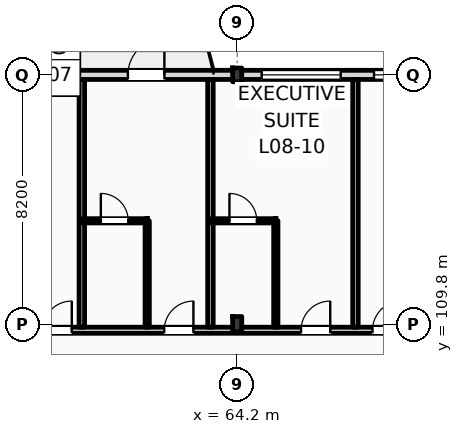
"""IFC4 building model, lengths in metres.
Left out: names, types, materials, properties, quantities, classifications, styles, units other than length and angle.
Written with IfcOpenShell. Run it as: python <this file> out.ifc"""

import sys

from ifc_helpers import new_model, si_unit, direction, frame, frame_2d, origin, origin_2d, place, context, subcontext, project, spatial, rectangle, i_section, extrude, element, fill, save


model = new_model("IFC4")
c1 = context("Model", 3, precision=1e-05, world=origin(), true_north=direction((0.0, 1.0)))
c2 = subcontext(c1, "Body", "Model", "MODEL_VIEW")
j1 = project(units=[si_unit("LENGTHUNIT", "METRE"), si_unit("PLANEANGLEUNIT", "RADIAN")], contexts=[c1])
p1 = place(None, origin())
s1 = spatial("IfcSite", under=j1, at=p1, CompositionType="ELEMENT")
p2 = place(p1, origin())
s2 = spatial("IfcBuilding", under=s1, at=p2, CompositionType="ELEMENT")
p3 = place(p2, frame((0.0, 0.0, 35.4)))
s3 = spatial("IfcBuildingStorey", under=s2, at=p3, CompositionType="ELEMENT", Elevation=35.4)
p4 = place(p3, frame((64.2, 109.8, 0.0), z_axis=(0.0, 0.0, 1.0), x_axis=(1.0, 0.0, 0.0)))
e1 = element("IfcColumn", 1, at=p4, inside=s3, PredefinedType="COLUMN", context=c2, shape_type="SweptSolid", body=[
    extrude(i_section(OverallWidth=0.3, OverallDepth=0.5, WebThickness=0.014, FlangeThickness=0.028, FilletRadius=0.027, at=origin_2d()), origin(), (0.0, 0.0, 1.0), 3.6),
])
p5 = place(p3, frame((64.2, 118.0, 0.0), z_axis=(0.0, 0.0, 1.0), x_axis=(1.0, 0.0, 0.0)))
e2 = element("IfcColumn", 2, at=p5, inside=s3, PredefinedType="COLUMN", context=c2, shape_type="SweptSolid", body=[
    extrude(i_section(OverallWidth=0.3, OverallDepth=0.45, WebThickness=0.014, FlangeThickness=0.026, FilletRadius=0.027, at=origin_2d()), origin(), (0.0, 0.0, 1.0), 3.6),
])
p6 = place(p3, frame((22.5, 118.0, 0.0), z_axis=(0.0, 0.0, 1.0), x_axis=(1.0, 0.0, 0.0)))
e3 = element("IfcWall", 3, at=p6, inside=s3, PredefinedType="STANDARD", context=c2, shape_type="SweptSolid", body=[
    extrude(rectangle(XDim=72.9, YDim=0.3, at=frame_2d((36.45, 0.0))), origin(), (0.0, 0.0, 1.0), 2.92),
])
p7 = place(p6, frame((0.91, 0.0, 0.9)))
e4 = element("IfcOpeningElement", 4, at=p7, cuts=e3, PredefinedType="OPENING", context=c2, shape_type="SweptSolid", body=[
    extrude(rectangle(XDim=0.9, YDim=1.84, at=frame_2d((0.45, 0.92))), frame((0.0, 0.16, 0.0), z_axis=(0.0, -1.0, 0.0), x_axis=(1.0, 0.0, 0.0)), (0.0, 0.0, 1.0), 0.32),
])
p8 = place(p6, frame((6.665, 0.0, 0.0)))
e5 = element("IfcOpeningElement", 5, at=p8, cuts=e3, PredefinedType="OPENING", context=c2, shape_type="SweptSolid", body=[
    extrude(rectangle(XDim=1.2, YDim=2.25, at=frame_2d((0.6, 1.125))), frame((0.0, 0.16, 0.0), z_axis=(0.0, -1.0, 0.0), x_axis=(1.0, 0.0, 0.0)), (0.0, 0.0, 1.0), 0.32),
])
p9 = place(p6, frame((11.355, 0.0, 0.9)))
e6 = element("IfcOpeningElement", 6, at=p9, cuts=e3, PredefinedType="OPENING", context=c2, shape_type="SweptSolid", body=[
    extrude(rectangle(XDim=1.1, YDim=1.5, at=frame_2d((0.55, 0.75))), frame((0.0, 0.16, 0.0), z_axis=(0.0, -1.0, 0.0), x_axis=(1.0, 0.0, 0.0)), (0.0, 0.0, 1.0), 0.32),
])
p10 = place(p6, frame((15.58, 0.0, 0.9)))
e7 = element("IfcOpeningElement", 7, at=p10, cuts=e3, PredefinedType="OPENING", context=c2, shape_type="SweptSolid", body=[
    extrude(rectangle(XDim=1.25, YDim=1.6, at=frame_2d((0.625, 0.8))), frame((0.0, 0.16, 0.0), z_axis=(0.0, -1.0, 0.0), x_axis=(1.0, 0.0, 0.0)), (0.0, 0.0, 1.0), 0.32),
])
p11 = place(p6, frame((21.08, 0.0, 0.0)))
e8 = element("IfcOpeningElement", 8, at=p11, cuts=e3, PredefinedType="OPENING", context=c2, shape_type="SweptSolid", body=[
    extrude(rectangle(XDim=1.2, YDim=2.25, at=frame_2d((0.6, 1.125))), frame((0.0, 0.16, 0.0), z_axis=(0.0, -1.0, 0.0), x_axis=(1.0, 0.0, 0.0)), (0.0, 0.0, 1.0), 0.32),
])
p12 = place(p6, frame((23.54, 0.0, 0.0)))
e9 = element("IfcOpeningElement", 9, at=p12, cuts=e3, PredefinedType="OPENING", context=c2, shape_type="SweptSolid", body=[
    extrude(rectangle(XDim=1.2, YDim=2.25, at=frame_2d((0.6, 1.125))), frame((0.0, 0.16, 0.0), z_axis=(0.0, -1.0, 0.0), x_axis=(1.0, 0.0, 0.0)), (0.0, 0.0, 1.0), 0.32),
])
p13 = place(p6, frame((28.83, 0.0, 0.9)))
e10 = element("IfcOpeningElement", 10, at=p13, cuts=e3, PredefinedType="OPENING", context=c2, shape_type="SweptSolid", body=[
    extrude(rectangle(XDim=1.75, YDim=1.84, at=frame_2d((0.875, 0.92))), frame((0.0, 0.16, 0.0), z_axis=(0.0, -1.0, 0.0), x_axis=(1.0, 0.0, 0.0)), (0.0, 0.0, 1.0), 0.32),
])
p14 = place(p6, frame((34.805, 0.0, 0.9)))
e11 = element("IfcOpeningElement", 11, at=p14, cuts=e3, PredefinedType="OPENING", context=c2, shape_type="SweptSolid", body=[
    extrude(rectangle(XDim=1.35, YDim=1.84, at=frame_2d((0.675, 0.92))), frame((0.0, 0.16, 0.0), z_axis=(0.0, -1.0, 0.0), x_axis=(1.0, 0.0, 0.0)), (0.0, 0.0, 1.0), 0.32),
])
p15 = place(p6, frame((38.105, 0.0, 0.0)))
e12 = element("IfcOpeningElement", 12, at=p15, cuts=e3, PredefinedType="OPENING", context=c2, shape_type="SweptSolid", body=[
    extrude(rectangle(XDim=1.2, YDim=2.25, at=frame_2d((0.6, 1.125))), frame((0.0, 0.16, 0.0), z_axis=(0.0, -1.0, 0.0), x_axis=(1.0, 0.0, 0.0)), (0.0, 0.0, 1.0), 0.32),
])
p16 = place(p6, frame((42.505, 0.0, 0.9)))
e13 = element("IfcOpeningElement", 13, at=p16, cuts=e3, PredefinedType="OPENING", context=c2, shape_type="SweptSolid", body=[
    extrude(rectangle(XDim=2.6, YDim=1.84, at=frame_2d((1.3, 0.92))), frame((0.0, 0.16, 0.0), z_axis=(0.0, -1.0, 0.0), x_axis=(1.0, 0.0, 0.0)), (0.0, 0.0, 1.0), 0.32),
])
p17 = place(p6, frame((46.2, 0.0, 0.9)))
e14 = element("IfcOpeningElement", 14, at=p17, cuts=e3, PredefinedType="OPENING", context=c2, shape_type="SweptSolid", body=[
    extrude(rectangle(XDim=1.8, YDim=1.84, at=frame_2d((0.9, 0.92))), frame((0.0, 0.16, 0.0), z_axis=(0.0, -1.0, 0.0), x_axis=(1.0, 0.0, 0.0)), (0.0, 0.0, 1.0), 0.32),
])
p18 = place(p6, frame((52.565, 0.0, 0.0)))
e15 = element("IfcOpeningElement", 15, at=p18, cuts=e3, PredefinedType="OPENING", context=c2, shape_type="SweptSolid", body=[
    extrude(rectangle(XDim=1.2, YDim=2.25, at=frame_2d((0.6, 1.125))), frame((0.0, 0.16, 0.0), z_axis=(0.0, -1.0, 0.0), x_axis=(1.0, 0.0, 0.0)), (0.0, 0.0, 1.0), 0.32),
])
p19 = place(p6, frame((55.305, 0.0, 0.9)))
e16 = element("IfcOpeningElement", 16, at=p19, cuts=e3, PredefinedType="OPENING", context=c2, shape_type="SweptSolid", body=[
    extrude(rectangle(XDim=1.2, YDim=1.8, at=frame_2d((0.6, 0.9))), frame((0.0, 0.16, 0.0), z_axis=(0.0, -1.0, 0.0), x_axis=(1.0, 0.0, 0.0)), (0.0, 0.0, 1.0), 0.32),
])
p20 = place(p6, frame((60.53, 0.0, 0.9)))
e17 = element("IfcOpeningElement", 17, at=p20, cuts=e3, PredefinedType="OPENING", context=c2, shape_type="SweptSolid", body=[
    extrude(rectangle(XDim=1.35, YDim=1.84, at=frame_2d((0.675, 0.92))), frame((0.0, 0.16, 0.0), z_axis=(0.0, -1.0, 0.0), x_axis=(1.0, 0.0, 0.0)), (0.0, 0.0, 1.0), 0.32),
])
p21 = place(p6, frame((65.955, 0.0, 0.9)))
e18 = element("IfcOpeningElement", 18, at=p21, cuts=e3, PredefinedType="OPENING", context=c2, shape_type="SweptSolid", body=[
    extrude(rectangle(XDim=1.35, YDim=1.84, at=frame_2d((0.675, 0.92))), frame((0.0, 0.16, 0.0), z_axis=(0.0, -1.0, 0.0), x_axis=(1.0, 0.0, 0.0)), (0.0, 0.0, 1.0), 0.32),
])
p22 = place(p6, frame((69.335, 0.0, 0.9)))
e19 = element("IfcOpeningElement", 19, at=p22, cuts=e3, PredefinedType="OPENING", context=c2, shape_type="SweptSolid", body=[
    extrude(rectangle(XDim=1.65, YDim=1.84, at=frame_2d((0.825, 0.92))), frame((0.0, 0.16, 0.0), z_axis=(0.0, -1.0, 0.0), x_axis=(1.0, 0.0, 0.0)), (0.0, 0.0, 1.0), 0.32),
])
p23 = place(p3, frame((10.65, 109.6, 0.0), z_axis=(0.0, 0.0, 1.0), x_axis=(1.0, 0.0, 0.0)))
e20 = element("IfcWall", 20, at=p23, inside=s3, PredefinedType="PARTITIONING", context=c2, shape_type="SweptSolid", body=[
    extrude(rectangle(XDim=84.61, YDim=0.2, at=frame_2d((42.305, 0.0))), origin(), (0.0, 0.0, 1.0), 2.82),
])
p24 = place(p23, frame((12.675, 0.0, 0.0)))
e21 = element("IfcOpeningElement", 21, at=p24, cuts=e20, PredefinedType="OPENING", context=c2, shape_type="SweptSolid", body=[
    extrude(rectangle(XDim=1.02, YDim=2.2, at=frame_2d((0.51, 1.1))), frame((0.0, 0.11, 0.0), z_axis=(0.0, -1.0, 0.0), x_axis=(1.0, 0.0, 0.0)), (0.0, 0.0, 1.0), 0.22),
])
p25 = place(p23, frame((19.62, 0.0, 0.0)))
e22 = element("IfcOpeningElement", 22, at=p25, cuts=e20, PredefinedType="OPENING", context=c2, shape_type="SweptSolid", body=[
    extrude(rectangle(XDim=1.02, YDim=2.2, at=frame_2d((0.51, 1.1))), frame((0.0, 0.11, 0.0), z_axis=(0.0, -1.0, 0.0), x_axis=(1.0, 0.0, 0.0)), (0.0, 0.0, 1.0), 0.22),
])
p26 = place(p23, frame((24.12, 0.0, 0.0)))
e23 = element("IfcOpeningElement", 23, at=p26, cuts=e20, PredefinedType="OPENING", context=c2, shape_type="SweptSolid", body=[
    extrude(rectangle(XDim=1.02, YDim=2.2, at=frame_2d((0.51, 1.1))), frame((0.0, 0.11, 0.0), z_axis=(0.0, -1.0, 0.0), x_axis=(1.0, 0.0, 0.0)), (0.0, 0.0, 1.0), 0.22),
])
p27 = place(p23, frame((26.47, 0.0, 0.0)))
e24 = element("IfcOpeningElement", 24, at=p27, cuts=e20, PredefinedType="OPENING", context=c2, shape_type="SweptSolid", body=[
    extrude(rectangle(XDim=1.02, YDim=2.2, at=frame_2d((0.51, 1.1))), frame((0.0, 0.11, 0.0), z_axis=(0.0, -1.0, 0.0), x_axis=(1.0, 0.0, 0.0)), (0.0, 0.0, 1.0), 0.22),
])
p28 = place(p23, frame((33.15, 0.0, 0.0)))
e25 = element("IfcOpeningElement", 25, at=p28, cuts=e20, PredefinedType="OPENING", context=c2, shape_type="SweptSolid", body=[
    extrude(rectangle(XDim=0.96, YDim=2.2, at=frame_2d((0.48, 1.1))), frame((0.0, 0.11, 0.0), z_axis=(0.0, -1.0, 0.0), x_axis=(1.0, 0.0, 0.0)), (0.0, 0.0, 1.0), 0.22),
])
p29 = place(p23, frame((35.5, 0.0, 0.0)))
e26 = element("IfcOpeningElement", 26, at=p29, cuts=e20, PredefinedType="OPENING", context=c2, shape_type="SweptSolid", body=[
    extrude(rectangle(XDim=0.96, YDim=2.2, at=frame_2d((0.48, 1.1))), frame((0.0, 0.11, 0.0), z_axis=(0.0, -1.0, 0.0), x_axis=(1.0, 0.0, 0.0)), (0.0, 0.0, 1.0), 0.22),
])
p30 = place(p23, frame((42.15, 0.0, 0.0)))
e27 = element("IfcOpeningElement", 27, at=p30, cuts=e20, PredefinedType="OPENING", context=c2, shape_type="SweptSolid", body=[
    extrude(rectangle(XDim=0.96, YDim=2.2, at=frame_2d((0.48, 1.1))), frame((0.0, 0.11, 0.0), z_axis=(0.0, -1.0, 0.0), x_axis=(1.0, 0.0, 0.0)), (0.0, 0.0, 1.0), 0.22),
])
p31 = place(p23, frame((47.15, 0.0, 0.0)))
e28 = element("IfcOpeningElement", 28, at=p31, cuts=e20, PredefinedType="OPENING", context=c2, shape_type="SweptSolid", body=[
    extrude(rectangle(XDim=0.96, YDim=2.2, at=frame_2d((0.48, 1.1))), frame((0.0, 0.11, 0.0), z_axis=(0.0, -1.0, 0.0), x_axis=(1.0, 0.0, 0.0)), (0.0, 0.0, 1.0), 0.22),
])
p32 = place(p23, frame((51.15, 0.0, 0.0)))
e29 = element("IfcOpeningElement", 29, at=p32, cuts=e20, PredefinedType="OPENING", context=c2, shape_type="SweptSolid", body=[
    extrude(rectangle(XDim=0.96, YDim=2.2, at=frame_2d((0.48, 1.1))), frame((0.0, 0.11, 0.0), z_axis=(0.0, -1.0, 0.0), x_axis=(1.0, 0.0, 0.0)), (0.0, 0.0, 1.0), 0.22),
])
p33 = place(p23, frame((55.65, 0.0, 0.0)))
e30 = element("IfcOpeningElement", 30, at=p33, cuts=e20, PredefinedType="OPENING", context=c2, shape_type="SweptSolid", body=[
    extrude(rectangle(XDim=0.96, YDim=2.2, at=frame_2d((0.48, 1.1))), frame((0.0, 0.11, 0.0), z_axis=(0.0, -1.0, 0.0), x_axis=(1.0, 0.0, 0.0)), (0.0, 0.0, 1.0), 0.22),
])
p34 = place(p23, frame((58.0, 0.0, 0.0)))
e31 = element("IfcOpeningElement", 31, at=p34, cuts=e20, PredefinedType="OPENING", context=c2, shape_type="SweptSolid", body=[
    extrude(rectangle(XDim=0.96, YDim=2.2, at=frame_2d((0.48, 1.1))), frame((0.0, 0.11, 0.0), z_axis=(0.0, -1.0, 0.0), x_axis=(1.0, 0.0, 0.0)), (0.0, 0.0, 1.0), 0.22),
])
p35 = place(p23, frame((64.65, 0.0, 0.0)))
e32 = element("IfcOpeningElement", 32, at=p35, cuts=e20, PredefinedType="OPENING", context=c2, shape_type="SweptSolid", body=[
    extrude(rectangle(XDim=0.96, YDim=2.2, at=frame_2d((0.48, 1.1))), frame((0.0, 0.11, 0.0), z_axis=(0.0, -1.0, 0.0), x_axis=(1.0, 0.0, 0.0)), (0.0, 0.0, 1.0), 0.22),
])
p36 = place(p23, frame((66.75, 0.0, 0.0)))
e33 = element("IfcOpeningElement", 33, at=p36, cuts=e20, PredefinedType="OPENING", context=c2, shape_type="SweptSolid", body=[
    extrude(rectangle(XDim=0.96, YDim=2.2, at=frame_2d((0.48, 1.1))), frame((0.0, 0.11, 0.0), z_axis=(0.0, -1.0, 0.0), x_axis=(1.0, 0.0, 0.0)), (0.0, 0.0, 1.0), 0.22),
])
p37 = place(p23, frame((73.65, 0.0, 0.0)))
e34 = element("IfcOpeningElement", 34, at=p37, cuts=e20, PredefinedType="OPENING", context=c2, shape_type="SweptSolid", body=[
    extrude(rectangle(XDim=0.96, YDim=2.2, at=frame_2d((0.48, 1.1))), frame((0.0, 0.11, 0.0), z_axis=(0.0, -1.0, 0.0), x_axis=(1.0, 0.0, 0.0)), (0.0, 0.0, 1.0), 0.22),
])
p38 = place(p23, frame((78.4, 0.0, 0.0)))
e35 = element("IfcOpeningElement", 35, at=p38, cuts=e20, PredefinedType="OPENING", context=c2, shape_type="SweptSolid", body=[
    extrude(rectangle(XDim=0.96, YDim=2.2, at=frame_2d((0.48, 1.1))), frame((0.0, 0.11, 0.0), z_axis=(0.0, -1.0, 0.0), x_axis=(1.0, 0.0, 0.0)), (0.0, 0.0, 1.0), 0.22),
])
p39 = place(p23, frame((80.455, 0.0, 0.0)))
e36 = element("IfcOpeningElement", 36, at=p39, cuts=e20, PredefinedType="OPENING", context=c2, shape_type="SweptSolid", body=[
    extrude(rectangle(XDim=0.96, YDim=2.2, at=frame_2d((0.48, 1.1))), frame((0.0, 0.11, 0.0), z_axis=(0.0, -1.0, 0.0), x_axis=(1.0, 0.0, 0.0)), (0.0, 0.0, 1.0), 0.22),
])
p40 = place(p23, frame((2.716, 0.0, 0.0)))
e37 = element("IfcOpeningElement", 37, at=p40, cuts=e20, PredefinedType="OPENING", context=c2, shape_type="SweptSolid", body=[
    extrude(rectangle(XDim=1.35, YDim=2.25, at=frame_2d((0.675, 1.125))), frame((0.0, 0.11, 0.0), z_axis=(0.0, -1.0, 0.0), x_axis=(1.0, 0.0, 0.0)), (0.0, 0.0, 1.0), 0.22),
])
p41 = place(p23, frame((6.65, 0.0, 0.0)))
e38 = element("IfcOpeningElement", 38, at=p41, cuts=e20, PredefinedType="OPENING", context=c2, shape_type="SweptSolid", body=[
    extrude(rectangle(XDim=1.35, YDim=2.25, at=frame_2d((0.675, 1.125))), frame((0.0, 0.11, 0.0), z_axis=(0.0, -1.0, 0.0), x_axis=(1.0, 0.0, 0.0)), (0.0, 0.0, 1.0), 0.22),
])
p42 = place(p23, frame((10.583, 0.0, 0.0)))
e39 = element("IfcOpeningElement", 39, at=p42, cuts=e20, PredefinedType="OPENING", context=c2, shape_type="SweptSolid", body=[
    extrude(rectangle(XDim=1.35, YDim=2.25, at=frame_2d((0.675, 1.125))), frame((0.0, 0.11, 0.0), z_axis=(0.0, -1.0, 0.0), x_axis=(1.0, 0.0, 0.0)), (0.0, 0.0, 1.0), 0.22),
])
p43 = place(p3, frame((59.09, 109.7, 0.0), z_axis=(0.0, 0.0, 1.0), x_axis=(0.0, 1.0, 0.0)))
e40 = element("IfcWall", 40, at=p43, inside=s3, PredefinedType="PARTITIONING", context=c2, shape_type="SweptSolid", body=[
    extrude(rectangle(XDim=8.15, YDim=0.18, at=frame_2d((4.075, 0.0))), origin(), (0.0, 0.0, 1.0), 3.07),
])
p44 = place(p3, frame((63.32, 109.7, 0.0), z_axis=(0.0, 0.0, 1.0), x_axis=(0.0, 1.0, 0.0)))
e41 = element("IfcWall", 41, at=p44, inside=s3, PredefinedType="PARTITIONING", context=c2, shape_type="SweptSolid", body=[
    extrude(rectangle(XDim=8.15, YDim=0.18, at=frame_2d((4.075, 0.0))), origin(), (0.0, 0.0, 1.0), 3.38),
])
p45 = place(p3, frame((61.24, 109.7, 0.0), z_axis=(0.0, 0.0, 1.0), x_axis=(0.0, 1.0, 0.0)))
e42 = element("IfcWall", 42, at=p45, inside=s3, PredefinedType="PARTITIONING", context=c2, shape_type="SweptSolid", body=[
    extrude(rectangle(XDim=3.5, YDim=0.14, at=frame_2d((1.75, 0.0))), origin(), (0.0, 0.0, 1.0), 3.38),
])
p46 = place(p3, frame((59.09, 113.2, 0.0), z_axis=(0.0, 0.0, 1.0), x_axis=(1.0, 0.0, 0.0)))
e43 = element("IfcWall", 43, at=p46, inside=s3, PredefinedType="PARTITIONING", context=c2, shape_type="SweptSolid", body=[
    extrude(rectangle(XDim=2.15, YDim=0.14, at=frame_2d((1.075, 0.0))), origin(), (0.0, 0.0, 1.0), 3.38),
])
p47 = place(p46, frame((0.625, 0.0, 0.0)))
e44 = element("IfcOpeningElement", 44, at=p47, cuts=e43, PredefinedType="OPENING", context=c2, shape_type="SweptSolid", body=[
    extrude(rectangle(XDim=0.9, YDim=2.1, at=frame_2d((0.45, 1.05))), frame((0.0, 0.08, 0.0), z_axis=(0.0, -1.0, 0.0), x_axis=(1.0, 0.0, 0.0)), (0.0, 0.0, 1.0), 0.16),
])
p48 = place(p3, frame((68.09, 109.7, 0.0), z_axis=(0.0, 0.0, 1.0), x_axis=(0.0, 1.0, 0.0)))
e45 = element("IfcWall", 45, at=p48, inside=s3, PredefinedType="PARTITIONING", context=c2, shape_type="SweptSolid", body=[
    extrude(rectangle(XDim=8.15, YDim=0.18, at=frame_2d((4.075, 0.0))), origin(), (0.0, 0.0, 1.0), 3.38),
])
p49 = place(p3, frame((65.47, 109.7, 0.0), z_axis=(0.0, 0.0, 1.0), x_axis=(0.0, 1.0, 0.0)))
e46 = element("IfcWall", 46, at=p49, inside=s3, PredefinedType="PARTITIONING", context=c2, shape_type="SweptSolid", body=[
    extrude(rectangle(XDim=3.5, YDim=0.14, at=frame_2d((1.75, 0.0))), origin(), (0.0, 0.0, 1.0), 3.38),
])
p50 = place(p3, frame((63.32, 113.2, 0.0), z_axis=(0.0, 0.0, 1.0), x_axis=(1.0, 0.0, 0.0)))
e47 = element("IfcWall", 47, at=p50, inside=s3, PredefinedType="PARTITIONING", context=c2, shape_type="SweptSolid", body=[
    extrude(rectangle(XDim=2.15, YDim=0.14, at=frame_2d((1.075, 0.0))), origin(), (0.0, 0.0, 1.0), 3.38),
])
p51 = place(p50, frame((0.625, 0.0, 0.0)))
e48 = element("IfcOpeningElement", 48, at=p51, cuts=e47, PredefinedType="OPENING", context=c2, shape_type="SweptSolid", body=[
    extrude(rectangle(XDim=0.9, YDim=2.1, at=frame_2d((0.45, 1.05))), frame((0.0, 0.08, 0.0), z_axis=(0.0, -1.0, 0.0), x_axis=(1.0, 0.0, 0.0)), (0.0, 0.0, 1.0), 0.16),
])
p52 = place(p14, origin())
e49 = element("IfcWindow", 49, at=p52, inside=s3, PartitioningType="DOUBLE_PANEL_VERTICAL", PredefinedType="WINDOW", context=c2, shape_type="SweptSolid", body=[
    extrude(rectangle(XDim=1.35, YDim=1.84, at=frame_2d((0.675, 0.92))), frame((0.0, 0.03, 0.0), z_axis=(0.0, -1.0, 0.0), x_axis=(1.0, 0.0, 0.0)), (0.0, 0.0, 1.0), 0.06),
])
fill(e11, e49)
p53 = place(p15, origin())
e50 = element("IfcDoor", 50, at=p53, inside=s3, OperationType="SINGLE_SWING_RIGHT", PredefinedType="DOOR", context=c2, shape_type="SweptSolid", body=[
    extrude(rectangle(XDim=1.2, YDim=2.25, at=frame_2d((0.6, 1.125))), frame((0.0, 0.025, 0.0), z_axis=(0.0, -1.0, 0.0), x_axis=(1.0, 0.0, 0.0)), (0.0, 0.0, 1.0), 0.05),
])
fill(e12, e50)
p54 = place(p16, origin())
e51 = element("IfcWindow", 51, at=p54, inside=s3, PartitioningType="DOUBLE_PANEL_VERTICAL", PredefinedType="WINDOW", context=c2, shape_type="SweptSolid", body=[
    extrude(rectangle(XDim=2.6, YDim=1.84, at=frame_2d((1.3, 0.92))), frame((0.0, 0.03, 0.0), z_axis=(0.0, -1.0, 0.0), x_axis=(1.0, 0.0, 0.0)), (0.0, 0.0, 1.0), 0.06),
])
fill(e13, e51)
p55 = place(p17, origin())
e52 = element("IfcWindow", 52, at=p55, inside=s3, PartitioningType="DOUBLE_PANEL_VERTICAL", PredefinedType="WINDOW", context=c2, shape_type="SweptSolid", body=[
    extrude(rectangle(XDim=1.8, YDim=1.84, at=frame_2d((0.9, 0.92))), frame((0.0, 0.03, 0.0), z_axis=(0.0, -1.0, 0.0), x_axis=(1.0, 0.0, 0.0)), (0.0, 0.0, 1.0), 0.06),
])
fill(e14, e52)
p56 = place(p31, origin())
e53 = element("IfcDoor", 53, at=p56, inside=s3, OperationType="SINGLE_SWING_RIGHT", PredefinedType="DOOR", context=c2, shape_type="SweptSolid", body=[
    extrude(rectangle(XDim=0.96, YDim=2.2, at=frame_2d((0.48, 1.1))), frame((0.0, 0.025, 0.0), z_axis=(0.0, -1.0, 0.0), x_axis=(1.0, 0.0, 0.0)), (0.0, 0.0, 1.0), 0.05),
])
fill(e28, e53)
p57 = place(p32, origin())
e54 = element("IfcDoor", 54, at=p57, inside=s3, OperationType="SINGLE_SWING_RIGHT", PredefinedType="DOOR", context=c2, shape_type="SweptSolid", body=[
    extrude(rectangle(XDim=0.96, YDim=2.2, at=frame_2d((0.48, 1.1))), frame((0.0, 0.025, 0.0), z_axis=(0.0, -1.0, 0.0), x_axis=(1.0, 0.0, 0.0)), (0.0, 0.0, 1.0), 0.05),
])
fill(e29, e54)
p58 = place(p47, origin())
e55 = element("IfcDoor", 55, at=p58, inside=s3, OperationType="SINGLE_SWING_LEFT", PredefinedType="DOOR", context=c2, shape_type="SweptSolid", body=[
    extrude(rectangle(XDim=0.9, YDim=2.1, at=frame_2d((0.45, 1.05))), frame((0.0, 0.025, 0.0), z_axis=(0.0, -1.0, 0.0), x_axis=(1.0, 0.0, 0.0)), (0.0, 0.0, 1.0), 0.05),
])
fill(e44, e55)
p59 = place(p33, origin())
e56 = element("IfcDoor", 56, at=p59, inside=s3, OperationType="SINGLE_SWING_RIGHT", PredefinedType="DOOR", context=c2, shape_type="SweptSolid", body=[
    extrude(rectangle(XDim=0.96, YDim=2.2, at=frame_2d((0.48, 1.1))), frame((0.0, 0.025, 0.0), z_axis=(0.0, -1.0, 0.0), x_axis=(1.0, 0.0, 0.0)), (0.0, 0.0, 1.0), 0.05),
])
fill(e30, e56)
p60 = place(p51, origin())
e57 = element("IfcDoor", 57, at=p60, inside=s3, OperationType="SINGLE_SWING_LEFT", PredefinedType="DOOR", context=c2, shape_type="SweptSolid", body=[
    extrude(rectangle(XDim=0.9, YDim=2.1, at=frame_2d((0.45, 1.05))), frame((0.0, 0.025, 0.0), z_axis=(0.0, -1.0, 0.0), x_axis=(1.0, 0.0, 0.0)), (0.0, 0.0, 1.0), 0.05),
])
fill(e48, e57)
p61 = place(p34, origin())
e58 = element("IfcDoor", 58, at=p61, inside=s3, OperationType="SINGLE_SWING_RIGHT", PredefinedType="DOOR", context=c2, shape_type="SweptSolid", body=[
    extrude(rectangle(XDim=0.96, YDim=2.2, at=frame_2d((0.48, 1.1))), frame((0.0, 0.025, 0.0), z_axis=(0.0, -1.0, 0.0), x_axis=(1.0, 0.0, 0.0)), (0.0, 0.0, 1.0), 0.05),
])
fill(e31, e58)
save(model, sys.argv[1])
